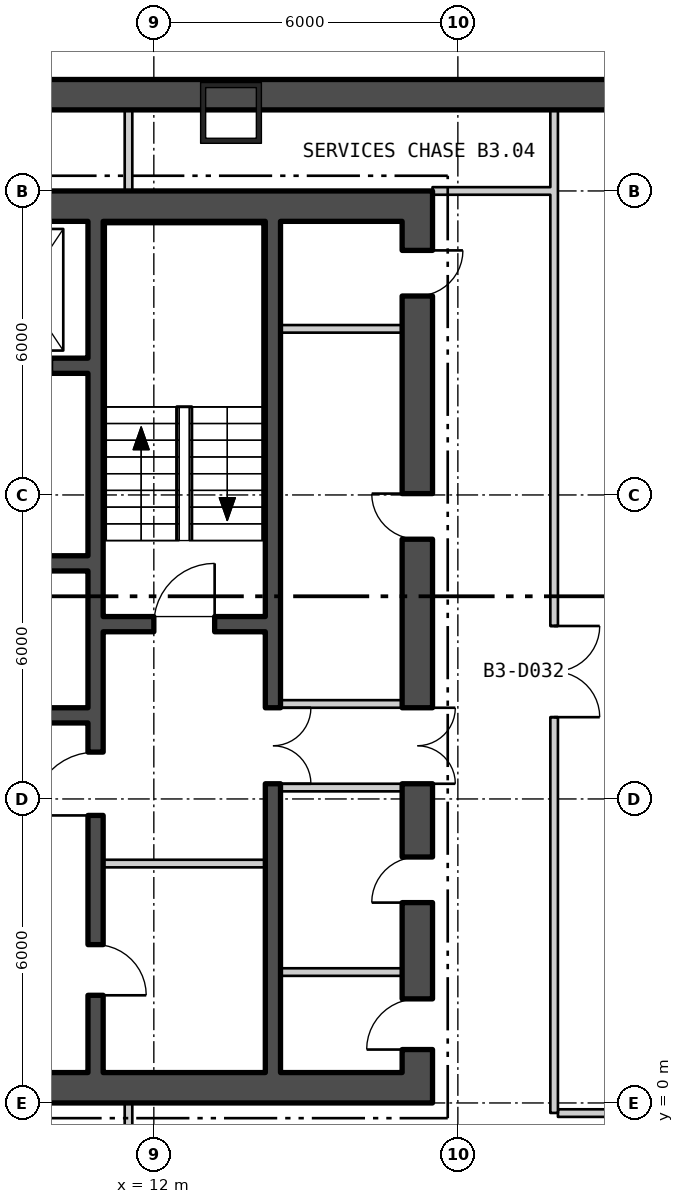
"""IFC4 building model, lengths in metres.
Left out: names, types, materials, properties, quantities, classifications, styles, units other than length and angle.
Written with IfcOpenShell. Run it as: python <this file> out.ifc"""

import sys

from ifc_helpers import new_model, si_unit, direction, frame, frame_2d, origin, origin_2d, place, context, subcontext, project, spatial, rectangle, hollow_rectangle, extrude, element, fill, save


model = new_model("IFC4")
c1 = context("Model", 3, precision=1e-05, world=origin(), true_north=direction((0.0, 1.0)))
c2 = subcontext(c1, "Body", "Model", "MODEL_VIEW")
j1 = project(units=[si_unit("LENGTHUNIT", "METRE"), si_unit("PLANEANGLEUNIT", "RADIAN")], contexts=[c1])
p1 = place(None, origin())
s1 = spatial("IfcSite", under=j1, at=p1, CompositionType="ELEMENT")
p2 = place(p1, origin())
s2 = spatial("IfcBuilding", under=s1, at=p2, CompositionType="ELEMENT")
p3 = place(p2, frame((0.0, 0.0, -16.8)))
s3 = spatial("IfcBuildingStorey", under=s2, at=p3, CompositionType="ELEMENT", Elevation=-16.8)
p4 = place(p3, frame((13.523, 19.54, 0.0), z_axis=(0.0, 0.0, 1.0), x_axis=(-1.0, 0.0, 0.0)))
e1 = element("IfcColumn", 1, at=p4, inside=s3, PredefinedType="COLUMN", context=c2, shape_type="SweptSolid", body=[
    extrude(hollow_rectangle(XDim=1.2, YDim=1.2, WallThickness=0.1, at=origin_2d()), origin(), (0.0, 0.0, 1.0), 5.4),
])
p5 = place(p3, frame((-39.0, 19.9, -0.4), z_axis=(0.0, 0.0, 1.0), x_axis=(1.0, 0.0, 0.0)))
e2 = element("IfcWall", 2, at=p5, inside=s3, PredefinedType="STANDARD", context=c2, shape_type="SweptSolid", body=[
    extrude(rectangle(XDim=78.0, YDim=0.6, at=frame_2d((39.0, 0.0))), origin(), (0.0, 0.0, 1.0), 5.4),
])
p6 = place(p3, frame((-17.5, 0.3, 0.0), z_axis=(0.0, 0.0, 1.0), x_axis=(1.0, 0.0, 0.0)))
e3 = element("IfcWall", 3, at=p6, inside=s3, PredefinedType="SHEAR", context=c2, shape_type="SweptSolid", body=[
    extrude(rectangle(XDim=35.0, YDim=0.6, at=frame_2d((17.5, 0.0))), origin(), (0.0, 0.0, 1.0), 4.95),
])
p7 = place(p6, frame((12.0, 0.0, 0.0)))
e4 = element("IfcOpeningElement", 4, at=p7, cuts=e3, PredefinedType="OPENING", context=c2, shape_type="SweptSolid", body=[
    extrude(rectangle(XDim=1.8, YDim=2.4, at=frame_2d((0.9, 1.2))), frame((0.0, 0.31, 0.0), z_axis=(0.0, -1.0, 0.0), x_axis=(1.0, 0.0, 0.0)), (0.0, 0.0, 1.0), 0.62),
])
p8 = place(p6, frame((22.0, 0.0, 0.0)))
e5 = element("IfcOpeningElement", 5, at=p8, cuts=e3, PredefinedType="OPENING", context=c2, shape_type="SweptSolid", body=[
    extrude(rectangle(XDim=1.8, YDim=2.4, at=frame_2d((0.9, 1.2))), frame((0.0, 0.31, 0.0), z_axis=(0.0, -1.0, 0.0), x_axis=(1.0, 0.0, 0.0)), (0.0, 0.0, 1.0), 0.62),
])
p9 = place(p3, frame((-17.5, 17.7, 0.0), z_axis=(0.0, 0.0, 1.0), x_axis=(1.0, 0.0, 0.0)))
e6 = element("IfcWall", 6, at=p9, inside=s3, PredefinedType="SHEAR", context=c2, shape_type="SweptSolid", body=[
    extrude(rectangle(XDim=35.0, YDim=0.6, at=frame_2d((17.5, 0.0))), origin(), (0.0, 0.0, 1.0), 4.95),
])
p10 = place(p3, frame((17.2, 0.6, 0.0), z_axis=(0.0, 0.0, 1.0), x_axis=(0.0, 1.0, 0.0)))
e7 = element("IfcWall", 7, at=p10, inside=s3, PredefinedType="SHEAR", context=c2, shape_type="SweptSolid", body=[
    extrude(rectangle(XDim=16.8, YDim=0.6, at=frame_2d((8.4, 0.0))), origin(), (0.0, 0.0, 1.0), 4.95),
])
p11 = place(p10, frame((5.7, 0.0, 0.0)))
e8 = element("IfcOpeningElement", 8, at=p11, cuts=e7, PredefinedType="OPENING", context=c2, shape_type="SweptSolid", body=[
    extrude(rectangle(XDim=1.5, YDim=2.1, at=frame_2d((0.75, 1.05))), frame((0.0, 0.31, 0.0), z_axis=(0.0, -1.0, 0.0), x_axis=(1.0, 0.0, 0.0)), (0.0, 0.0, 1.0), 0.62),
])
p12 = place(p10, frame((0.454, 0.0, 0.0)))
e9 = element("IfcOpeningElement", 9, at=p12, cuts=e7, PredefinedType="OPENING", context=c2, shape_type="SweptSolid", body=[
    extrude(rectangle(XDim=1.0, YDim=2.1, at=frame_2d((0.5, 1.05))), frame((0.0, 0.31, 0.0), z_axis=(0.0, -1.0, 0.0), x_axis=(1.0, 0.0, 0.0)), (0.0, 0.0, 1.0), 0.62),
])
p13 = place(p10, frame((3.354, 0.0, 0.0)))
e10 = element("IfcOpeningElement", 10, at=p13, cuts=e7, PredefinedType="OPENING", context=c2, shape_type="SweptSolid", body=[
    extrude(rectangle(XDim=0.9, YDim=2.1, at=frame_2d((0.45, 1.05))), frame((0.0, 0.31, 0.0), z_axis=(0.0, -1.0, 0.0), x_axis=(1.0, 0.0, 0.0)), (0.0, 0.0, 1.0), 0.62),
])
p14 = place(p10, frame((10.527, 0.0, 0.0)))
e11 = element("IfcOpeningElement", 11, at=p14, cuts=e7, PredefinedType="OPENING", context=c2, shape_type="SweptSolid", body=[
    extrude(rectangle(XDim=0.9, YDim=2.1, at=frame_2d((0.45, 1.05))), frame((0.0, 0.31, 0.0), z_axis=(0.0, -1.0, 0.0), x_axis=(1.0, 0.0, 0.0)), (0.0, 0.0, 1.0), 0.62),
])
p15 = place(p10, frame((15.327, 0.0, 0.0)))
e12 = element("IfcOpeningElement", 12, at=p15, cuts=e7, PredefinedType="OPENING", context=c2, shape_type="SweptSolid", body=[
    extrude(rectangle(XDim=0.9, YDim=2.1, at=frame_2d((0.45, 1.05))), frame((0.0, 0.31, 0.0), z_axis=(0.0, -1.0, 0.0), x_axis=(1.0, 0.0, 0.0)), (0.0, 0.0, 1.0), 0.62),
])
p16 = place(p3, frame((10.85, 0.6, 0.0), z_axis=(0.0, 0.0, 1.0), x_axis=(0.0, 1.0, 0.0)))
e13 = element("IfcWall", 13, at=p16, inside=s3, PredefinedType="SHEAR", context=c2, shape_type="SweptSolid", body=[
    extrude(rectangle(XDim=16.8, YDim=0.3, at=frame_2d((8.4, 0.0))), origin(), (0.0, 0.0, 1.0), 4.95),
])
p17 = place(p16, frame((5.075, 0.0, 0.0)))
e14 = element("IfcOpeningElement", 14, at=p17, cuts=e13, PredefinedType="OPENING", context=c2, shape_type="SweptSolid", body=[
    extrude(rectangle(XDim=1.25, YDim=2.1, at=frame_2d((0.625, 1.05))), frame((0.0, 0.16, 0.0), z_axis=(0.0, -1.0, 0.0), x_axis=(1.0, 0.0, 0.0)), (0.0, 0.0, 1.0), 0.32),
])
p18 = place(p16, frame((1.525, 0.0, 0.0)))
e15 = element("IfcOpeningElement", 15, at=p18, cuts=e13, PredefinedType="OPENING", context=c2, shape_type="SweptSolid", body=[
    extrude(rectangle(XDim=1.0, YDim=2.1, at=frame_2d((0.5, 1.05))), frame((0.0, 0.16, 0.0), z_axis=(0.0, -1.0, 0.0), x_axis=(1.0, 0.0, 0.0)), (0.0, 0.0, 1.0), 0.32),
])
p19 = place(p3, frame((14.35, 0.6, 0.0), z_axis=(0.0, 0.0, 1.0), x_axis=(0.0, 1.0, 0.0)))
e16 = element("IfcWall", 16, at=p19, inside=s3, PredefinedType="SHEAR", context=c2, shape_type="SweptSolid", body=[
    extrude(rectangle(XDim=16.8, YDim=0.3, at=frame_2d((8.4, 0.0))), origin(), (0.0, 0.0, 1.0), 4.95),
])
p20 = place(p19, frame((5.7, 0.0, 0.0)))
e17 = element("IfcOpeningElement", 17, at=p20, cuts=e16, PredefinedType="OPENING", context=c2, shape_type="SweptSolid", body=[
    extrude(rectangle(XDim=1.5, YDim=2.1, at=frame_2d((0.75, 1.05))), frame((0.0, 0.16, 0.0), z_axis=(0.0, -1.0, 0.0), x_axis=(1.0, 0.0, 0.0)), (0.0, 0.0, 1.0), 0.32),
])
p21 = place(p3, frame((11.0, 9.45, 0.0), z_axis=(0.0, 0.0, 1.0), x_axis=(1.0, 0.0, 0.0)))
e18 = element("IfcWall", 18, at=p21, inside=s3, PredefinedType="SHEAR", context=c2, shape_type="SweptSolid", body=[
    extrude(rectangle(XDim=3.2, YDim=0.3, at=frame_2d((1.6, 0.0))), origin(), (0.0, 0.0, 1.0), 4.95),
])
p22 = place(p21, frame((1.0, 0.0, 0.0)))
e19 = element("IfcOpeningElement", 19, at=p22, cuts=e18, PredefinedType="OPENING", context=c2, shape_type="SweptSolid", body=[
    extrude(rectangle(XDim=1.2, YDim=2.1, at=frame_2d((0.6, 1.05))), frame((0.0, 0.16, 0.0), z_axis=(0.0, -1.0, 0.0), x_axis=(1.0, 0.0, 0.0)), (0.0, 0.0, 1.0), 0.32),
])
p23 = place(p3, frame((-10.7, 14.55, 0.0), z_axis=(0.0, 0.0, 1.0), x_axis=(1.0, 0.0, 0.0)))
e20 = element("IfcWall", 20, at=p23, inside=s3, PredefinedType="SHEAR", context=c2, shape_type="SweptSolid", body=[
    extrude(rectangle(XDim=21.4, YDim=0.3, at=frame_2d((10.7, 0.0))), origin(), (0.0, 0.0, 1.0), 4.95),
])
p24 = place(p23, frame((0.738, 0.0, 0.0)))
e21 = element("IfcOpeningElement", 21, at=p24, cuts=e20, PredefinedType="OPENING", context=c2, shape_type="SweptSolid", body=[
    extrude(rectangle(XDim=1.1, YDim=2.1, at=frame_2d((0.55, 1.05))), frame((0.0, 0.16, 0.0), z_axis=(0.0, -1.0, 0.0), x_axis=(1.0, 0.0, 0.0)), (0.0, 0.0, 1.0), 0.32),
])
p25 = place(p23, frame((19.562, 0.0, 0.0)))
e22 = element("IfcOpeningElement", 22, at=p25, cuts=e20, PredefinedType="OPENING", context=c2, shape_type="SweptSolid", body=[
    extrude(rectangle(XDim=1.1, YDim=2.1, at=frame_2d((0.55, 1.05))), frame((0.0, 0.16, 0.0), z_axis=(0.0, -1.0, 0.0), x_axis=(1.0, 0.0, 0.0)), (0.0, 0.0, 1.0), 0.32),
])
p26 = place(p23, frame((3.513, 0.0, 0.0)))
e23 = element("IfcOpeningElement", 23, at=p26, cuts=e20, PredefinedType="OPENING", context=c2, shape_type="SweptSolid", body=[
    extrude(rectangle(XDim=1.0, YDim=2.1, at=frame_2d((0.5, 1.05))), frame((0.0, 0.16, 0.0), z_axis=(0.0, -1.0, 0.0), x_axis=(1.0, 0.0, 0.0)), (0.0, 0.0, 1.0), 0.32),
])
p27 = place(p23, frame((6.188, 0.0, 0.0)))
e24 = element("IfcOpeningElement", 24, at=p27, cuts=e20, PredefinedType="OPENING", context=c2, shape_type="SweptSolid", body=[
    extrude(rectangle(XDim=1.0, YDim=2.1, at=frame_2d((0.5, 1.05))), frame((0.0, 0.16, 0.0), z_axis=(0.0, -1.0, 0.0), x_axis=(1.0, 0.0, 0.0)), (0.0, 0.0, 1.0), 0.32),
])
p28 = place(p23, frame((8.863, 0.0, 0.0)))
e25 = element("IfcOpeningElement", 25, at=p28, cuts=e20, PredefinedType="OPENING", context=c2, shape_type="SweptSolid", body=[
    extrude(rectangle(XDim=1.0, YDim=2.1, at=frame_2d((0.5, 1.05))), frame((0.0, 0.16, 0.0), z_axis=(0.0, -1.0, 0.0), x_axis=(1.0, 0.0, 0.0)), (0.0, 0.0, 1.0), 0.32),
])
p29 = place(p23, frame((11.537, 0.0, 0.0)))
e26 = element("IfcOpeningElement", 26, at=p29, cuts=e20, PredefinedType="OPENING", context=c2, shape_type="SweptSolid", body=[
    extrude(rectangle(XDim=1.0, YDim=2.1, at=frame_2d((0.5, 1.05))), frame((0.0, 0.16, 0.0), z_axis=(0.0, -1.0, 0.0), x_axis=(1.0, 0.0, 0.0)), (0.0, 0.0, 1.0), 0.32),
])
p30 = place(p23, frame((14.213, 0.0, 0.0)))
e27 = element("IfcOpeningElement", 27, at=p30, cuts=e20, PredefinedType="OPENING", context=c2, shape_type="SweptSolid", body=[
    extrude(rectangle(XDim=1.0, YDim=2.1, at=frame_2d((0.5, 1.05))), frame((0.0, 0.16, 0.0), z_axis=(0.0, -1.0, 0.0), x_axis=(1.0, 0.0, 0.0)), (0.0, 0.0, 1.0), 0.32),
])
p31 = place(p23, frame((16.887, 0.0, 0.0)))
e28 = element("IfcOpeningElement", 28, at=p31, cuts=e20, PredefinedType="OPENING", context=c2, shape_type="SweptSolid", body=[
    extrude(rectangle(XDim=1.0, YDim=2.1, at=frame_2d((0.5, 1.05))), frame((0.0, 0.16, 0.0), z_axis=(0.0, -1.0, 0.0), x_axis=(1.0, 0.0, 0.0)), (0.0, 0.0, 1.0), 0.32),
])
p32 = place(p3, frame((2.6, 10.65, 0.0), z_axis=(0.0, 0.0, 1.0), x_axis=(1.0, 0.0, 0.0)))
e29 = element("IfcWall", 29, at=p32, inside=s3, PredefinedType="SHEAR", context=c2, shape_type="SweptSolid", body=[
    extrude(rectangle(XDim=8.1, YDim=0.3, at=frame_2d((4.05, 0.0))), origin(), (0.0, 0.0, 1.0), 4.95),
])
p33 = place(p32, frame((0.933, 0.0, 0.0)))
e30 = element("IfcOpeningElement", 30, at=p33, cuts=e29, PredefinedType="OPENING", context=c2, shape_type="SweptSolid", body=[
    extrude(rectangle(XDim=1.0, YDim=2.1, at=frame_2d((0.5, 1.05))), frame((0.0, 0.16, 0.0), z_axis=(0.0, -1.0, 0.0), x_axis=(1.0, 0.0, 0.0)), (0.0, 0.0, 1.0), 0.32),
])
p34 = place(p32, frame((3.6, 0.0, 0.0)))
e31 = element("IfcOpeningElement", 31, at=p34, cuts=e29, PredefinedType="OPENING", context=c2, shape_type="SweptSolid", body=[
    extrude(rectangle(XDim=1.0, YDim=2.1, at=frame_2d((0.5, 1.05))), frame((0.0, 0.16, 0.0), z_axis=(0.0, -1.0, 0.0), x_axis=(1.0, 0.0, 0.0)), (0.0, 0.0, 1.0), 0.32),
])
p35 = place(p32, frame((6.317, 0.0, 0.0)))
e32 = element("IfcOpeningElement", 32, at=p35, cuts=e29, PredefinedType="OPENING", context=c2, shape_type="SweptSolid", body=[
    extrude(rectangle(XDim=1.0, YDim=2.1, at=frame_2d((0.5, 1.05))), frame((0.0, 0.16, 0.0), z_axis=(0.0, -1.0, 0.0), x_axis=(1.0, 0.0, 0.0)), (0.0, 0.0, 1.0), 0.32),
])
p36 = place(p3, frame((2.6, 7.65, 0.0), z_axis=(0.0, 0.0, 1.0), x_axis=(1.0, 0.0, 0.0)))
e33 = element("IfcWall", 33, at=p36, inside=s3, PredefinedType="SHEAR", context=c2, shape_type="SweptSolid", body=[
    extrude(rectangle(XDim=8.1, YDim=0.3, at=frame_2d((4.05, 0.0))), origin(), (0.0, 0.0, 1.0), 4.95),
])
p37 = place(p3, frame((11.0, 4.725, 0.0), z_axis=(0.0, 0.0, 1.0), x_axis=(1.0, 0.0, 0.0)))
e34 = element("IfcWall", 34, at=p37, inside=s3, PredefinedType="PARTITIONING", context=c2, shape_type="SweptSolid", body=[
    extrude(rectangle(XDim=3.2, YDim=0.15, at=frame_2d((1.6, 0.0))), origin(), (0.0, 0.0, 1.0), 4.95),
])
for number, where, z_axis, x_axis in (
    (35, (14.5, 6.225, 0.0), (0.0, 0.0, 1.0), (1.0, 0.0, 0.0)),
    (36, (14.5, 7.875, 0.0), (0.0, 0.0, 1.0), (1.0, 0.0, 0.0)),
    (37, (14.5, 2.583, 0.0), (0.0, 0.0, 1.0), (1.0, 0.0, 0.0)),
    (38, (14.5, 15.278, 0.0), (0.0, 0.0, 1.0), (1.0, 0.0, 0.0)),
):
    element("IfcWall", number, at=place(p3, frame(where, z_axis=z_axis, x_axis=x_axis)), inside=s3, PredefinedType="PARTITIONING", context=c2, shape_type="SweptSolid", body=[
        extrude(rectangle(XDim=2.4, YDim=0.15, at=frame_2d((1.2, 0.0))), origin(), (0.0, 0.0, 1.0), 4.95),
    ])
p38 = place(p3, frame((11.5, -6.075, 0.0), z_axis=(0.0, 0.0, 1.0), x_axis=(0.0, 1.0, 0.0)))
e39 = element("IfcWall", 39, at=p38, inside=s3, PredefinedType="PARTITIONING", context=c2, shape_type="SweptSolid", body=[
    extrude(rectangle(XDim=6.075, YDim=0.15, at=frame_2d((3.038, 0.0))), origin(), (0.0, 0.0, 1.0), 4.95),
])
p39 = place(p38, frame((4.375, 0.0, 0.0)))
e40 = element("IfcOpeningElement", 40, at=p39, cuts=e39, PredefinedType="OPENING", context=c2, shape_type="SweptSolid", body=[
    extrude(rectangle(XDim=1.0, YDim=2.1, at=frame_2d((0.5, 1.05))), frame((0.0, 0.085, 0.0), z_axis=(0.0, -1.0, 0.0), x_axis=(1.0, 0.0, 0.0)), (0.0, 0.0, 1.0), 0.17),
])
p40 = place(p3, frame((11.5, 18.0, 0.0), z_axis=(0.0, 0.0, 1.0), x_axis=(0.0, 1.0, 0.0)))
e41 = element("IfcWall", 41, at=p40, inside=s3, PredefinedType="PARTITIONING", context=c2, shape_type="SweptSolid", body=[
    extrude(rectangle(XDim=1.75, YDim=0.15, at=frame_2d((0.875, 0.0))), origin(), (0.0, 0.0, 1.0), 4.95),
])
p41 = place(p3, frame((17.5, 18.0, 0.0), z_axis=(0.0, 0.0, 1.0), x_axis=(1.0, 0.0, 0.0)))
e42 = element("IfcWall", 42, at=p41, inside=s3, PredefinedType="PARTITIONING", context=c2, shape_type="SweptSolid", body=[
    extrude(rectangle(XDim=2.475, YDim=0.15, at=frame_2d((1.238, 0.0))), origin(), (0.0, 0.0, 1.0), 4.95),
])
p42 = place(p3, frame((19.9, -0.197, 0.0), z_axis=(0.0, 0.0, 1.0), x_axis=(0.0, 1.0, 0.0)))
e43 = element("IfcWall", 43, at=p42, inside=s3, PredefinedType="PARTITIONING", context=c2, shape_type="SweptSolid", body=[
    extrude(rectangle(XDim=18.122, YDim=0.15, at=frame_2d((9.061, 0.0))), origin(), (0.0, 0.0, 1.0), 4.95),
])
p43 = place(p42, frame((7.811, 0.0, 0.0)))
e44 = element("IfcOpeningElement", 44, at=p43, cuts=e43, PredefinedType="OPENING", context=c2, shape_type="SweptSolid", body=[
    extrude(rectangle(XDim=1.8, YDim=2.1, at=frame_2d((0.9, 1.05))), frame((0.0, 0.085, 0.0), z_axis=(0.0, -1.0, 0.0), x_axis=(1.0, 0.0, 0.0)), (0.0, 0.0, 1.0), 0.17),
])
p44 = place(p3, frame((19.9, 18.075, 0.0), z_axis=(0.0, 0.0, 1.0), x_axis=(0.0, 1.0, 0.0)))
e45 = element("IfcWall", 45, at=p44, inside=s3, PredefinedType="PARTITIONING", context=c2, shape_type="SweptSolid", body=[
    extrude(rectangle(XDim=1.675, YDim=0.15, at=frame_2d((0.838, 0.0))), origin(), (0.0, 0.0, 1.0), 4.95),
])
p45 = place(p3, frame((19.975, -0.2, 0.0), z_axis=(0.0, 0.0, 1.0), x_axis=(1.0, 0.0, 0.0)))
e46 = element("IfcWall", 46, at=p45, inside=s3, PredefinedType="PARTITIONING", context=c2, shape_type="SweptSolid", body=[
    extrude(rectangle(XDim=6.775, YDim=0.15, at=frame_2d((3.388, 0.0))), origin(), (0.0, 0.0, 1.0), 4.95),
])
p46 = place(p22, origin())
e47 = element("IfcDoor", 47, at=p46, inside=s3, OperationType="SINGLE_SWING_LEFT", PredefinedType="DOOR", context=c2, shape_type="SweptSolid", body=[
    extrude(rectangle(XDim=1.2, YDim=2.1, at=frame_2d((0.6, 1.05))), frame((0.0, 0.025, 0.0), z_axis=(0.0, -1.0, 0.0), x_axis=(1.0, 0.0, 0.0)), (0.0, 0.0, 1.0), 0.05),
])
fill(e19, e47)
p47 = place(p17, origin())
e48 = element("IfcDoor", 48, at=p47, inside=s3, OperationType="SINGLE_SWING_RIGHT", PredefinedType="DOOR", context=c2, shape_type="SweptSolid", body=[
    extrude(rectangle(XDim=1.25, YDim=2.1, at=frame_2d((0.625, 1.05))), frame((0.0, 0.025, 0.0), z_axis=(0.0, -1.0, 0.0), x_axis=(1.0, 0.0, 0.0)), (0.0, 0.0, 1.0), 0.05),
])
fill(e14, e48)
p48 = place(p18, origin())
e49 = element("IfcDoor", 49, at=p48, inside=s3, OperationType="SINGLE_SWING_LEFT", PredefinedType="DOOR", context=c2, shape_type="SweptSolid", body=[
    extrude(rectangle(XDim=1.0, YDim=2.1, at=frame_2d((0.5, 1.05))), frame((0.0, 0.025, 0.0), z_axis=(0.0, -1.0, 0.0), x_axis=(1.0, 0.0, 0.0)), (0.0, 0.0, 1.0), 0.05),
])
fill(e15, e49)
p49 = place(p20, origin())
e50 = element("IfcDoor", 50, at=p49, inside=s3, OperationType="DOUBLE_DOOR_SINGLE_SWING", PredefinedType="DOOR", context=c2, shape_type="SweptSolid", body=[
    extrude(rectangle(XDim=1.5, YDim=2.1, at=frame_2d((0.75, 1.05))), frame((0.0, 0.025, 0.0), z_axis=(0.0, -1.0, 0.0), x_axis=(1.0, 0.0, 0.0)), (0.0, 0.0, 1.0), 0.05),
])
fill(e17, e50)
p50 = place(p11, origin())
e51 = element("IfcDoor", 51, at=p50, inside=s3, OperationType="DOUBLE_DOOR_SINGLE_SWING", PredefinedType="DOOR", context=c2, shape_type="SweptSolid", body=[
    extrude(rectangle(XDim=1.5, YDim=2.1, at=frame_2d((0.75, 1.05))), frame((0.0, 0.025, 0.0), z_axis=(0.0, -1.0, 0.0), x_axis=(1.0, 0.0, 0.0)), (0.0, 0.0, 1.0), 0.05),
])
fill(e8, e51)
p51 = place(p12, origin())
e52 = element("IfcDoor", 52, at=p51, inside=s3, OperationType="SINGLE_SWING_RIGHT", PredefinedType="DOOR", context=c2, shape_type="SweptSolid", body=[
    extrude(rectangle(XDim=1.0, YDim=2.1, at=frame_2d((0.5, 1.05))), frame((0.0, 0.025, 0.0), z_axis=(0.0, -1.0, 0.0), x_axis=(1.0, 0.0, 0.0)), (0.0, 0.0, 1.0), 0.05),
])
fill(e9, e52)
p52 = place(p13, origin())
e53 = element("IfcDoor", 53, at=p52, inside=s3, OperationType="SINGLE_SWING_RIGHT", PredefinedType="DOOR", context=c2, shape_type="SweptSolid", body=[
    extrude(rectangle(XDim=0.9, YDim=2.1, at=frame_2d((0.45, 1.05))), frame((0.0, 0.025, 0.0), z_axis=(0.0, -1.0, 0.0), x_axis=(1.0, 0.0, 0.0)), (0.0, 0.0, 1.0), 0.05),
])
fill(e10, e53)
p53 = place(p14, origin())
e54 = element("IfcDoor", 54, at=p53, inside=s3, OperationType="SINGLE_SWING_LEFT", PredefinedType="DOOR", context=c2, shape_type="SweptSolid", body=[
    extrude(rectangle(XDim=0.9, YDim=2.1, at=frame_2d((0.45, 1.05))), frame((0.0, 0.025, 0.0), z_axis=(0.0, -1.0, 0.0), x_axis=(1.0, 0.0, 0.0)), (0.0, 0.0, 1.0), 0.05),
])
fill(e11, e54)
p54 = place(p15, origin())
e55 = element("IfcDoor", 55, at=p54, inside=s3, OperationType="SINGLE_SWING_RIGHT", PredefinedType="DOOR", context=c2, shape_type="SweptSolid", body=[
    extrude(rectangle(XDim=0.9, YDim=2.1, at=frame_2d((0.45, 1.05))), frame((0.0, 0.025, 0.0), z_axis=(0.0, -1.0, 0.0), x_axis=(1.0, 0.0, 0.0)), (0.0, 0.0, 1.0), 0.05),
])
fill(e12, e55)
p55 = place(p43, origin())
e56 = element("IfcDoor", 56, at=p55, inside=s3, OperationType="DOUBLE_DOOR_SINGLE_SWING", PredefinedType="DOOR", context=c2, shape_type="SweptSolid", body=[
    extrude(rectangle(XDim=1.8, YDim=2.1, at=frame_2d((0.9, 1.05))), frame((0.0, 0.025, 0.0), z_axis=(0.0, -1.0, 0.0), x_axis=(1.0, 0.0, 0.0)), (0.0, 0.0, 1.0), 0.05),
])
fill(e44, e56)
save(model, sys.argv[1])
